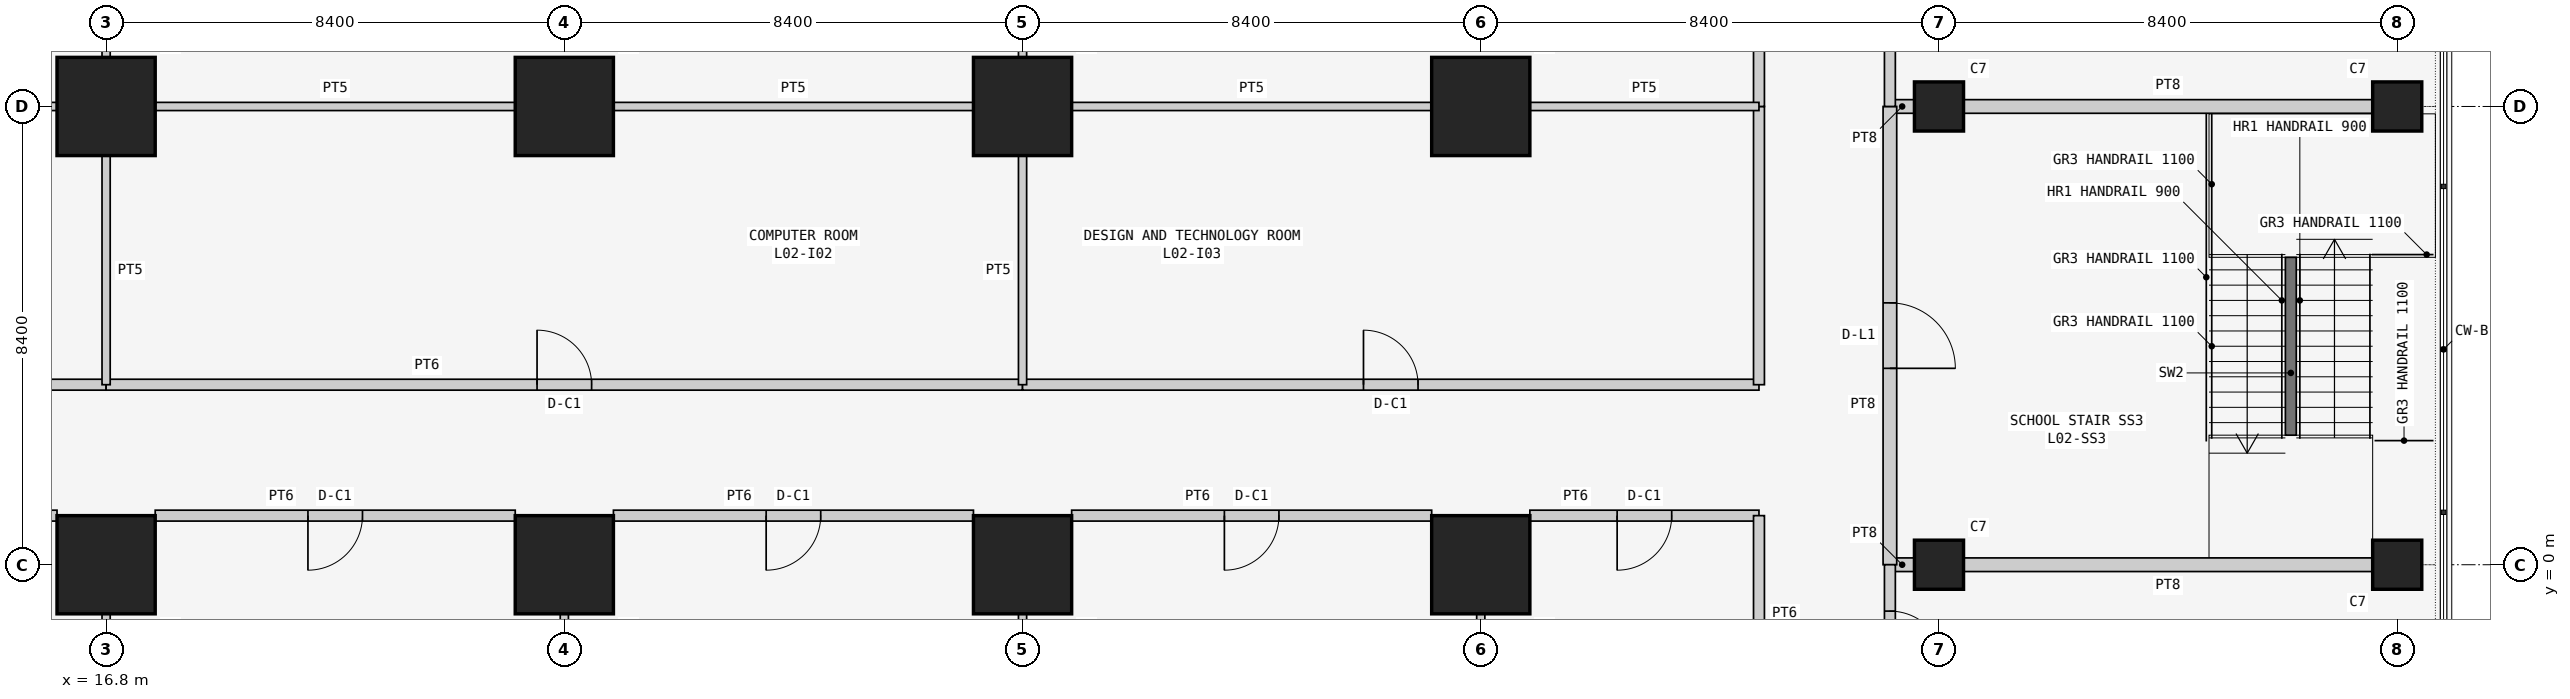
"""IFC4 building model, lengths in metres.
Left out: names, types, materials, properties, quantities, classifications, styles, units other than length and angle.
Written with IfcOpenShell. Run it as: python <this file> out.ifc"""

import sys

from ifc_helpers import new_model, si_unit, direction, frame, frame_2d, origin, origin_2d, place, context, subcontext, project, spatial, rectangle, extrude, element, fill, save


model = new_model("IFC4")
c1 = context("Model", 3, precision=1e-05, world=origin(), true_north=direction((0.0, 1.0)))
c2 = subcontext(c1, "Body", "Model", "MODEL_VIEW")
j1 = project(units=[si_unit("LENGTHUNIT", "METRE"), si_unit("PLANEANGLEUNIT", "RADIAN")], contexts=[c1])
p1 = place(None, origin())
s1 = spatial("IfcSite", under=j1, at=p1, CompositionType="ELEMENT")
p2 = place(p1, origin())
s2 = spatial("IfcBuilding", under=s1, at=p2, CompositionType="ELEMENT")
p3 = place(p2, frame((0.0, 0.0, 10.5)))
s3 = spatial("IfcBuildingStorey", under=s2, at=p3, CompositionType="ELEMENT", Elevation=10.5)
for number, where, z_axis, x_axis in (
    (1, (16.8, 0.0, 0.0), (0.0, 0.0, 1.0), (1.0, 0.0, 0.0)),
    (2, (16.8, 8.4, 0.0), (0.0, 0.0, 1.0), (1.0, 0.0, 0.0)),
    (3, (25.2, 0.0, 0.0), (0.0, 0.0, 1.0), (1.0, 0.0, 0.0)),
    (4, (25.2, 8.4, 0.0), (0.0, 0.0, 1.0), (1.0, 0.0, 0.0)),
    (5, (33.6, 0.0, 0.0), (0.0, 0.0, 1.0), (1.0, 0.0, 0.0)),
    (6, (33.6, 8.4, 0.0), (0.0, 0.0, 1.0), (1.0, 0.0, 0.0)),
    (7, (42.0, 0.0, 0.0), (0.0, 0.0, 1.0), (1.0, 0.0, 0.0)),
    (8, (42.0, 8.4, 0.0), (0.0, 0.0, 1.0), (1.0, 0.0, 0.0)),
):
    element("IfcColumn", number, at=place(p3, frame(where, z_axis=z_axis, x_axis=x_axis)), inside=s3, PredefinedType="COLUMN", context=c2, shape_type="SweptSolid", body=[
        extrude(rectangle(XDim=1.8, YDim=1.8, at=origin_2d()), origin(), (0.0, 0.0, 1.0), 4.5),
    ])
for number, where, z_axis, x_axis in (
    (9, (50.4, 0.0, 0.0), (0.0, 0.0, 1.0), (1.0, 0.0, 0.0)),
    (10, (50.4, 8.4, 0.0), (0.0, 0.0, 1.0), (1.0, 0.0, 0.0)),
    (11, (58.8, 0.0, 0.0), (0.0, 0.0, 1.0), (1.0, 0.0, 0.0)),
    (12, (58.8, 8.4, 0.0), (0.0, 0.0, 1.0), (1.0, 0.0, 0.0)),
):
    element("IfcColumn", number, at=place(p3, frame(where, z_axis=z_axis, x_axis=x_axis)), inside=s3, PredefinedType="COLUMN", context=c2, shape_type="SweptSolid", body=[
        extrude(rectangle(XDim=0.9, YDim=0.9, at=origin_2d()), origin(), (0.0, 0.0, 1.0), 4.5),
    ])
p4 = place(p3, frame((49.95, 0.0, 0.0), z_axis=(0.0, 0.0, 1.0), x_axis=(-1.0, 0.0, 0.0)))
e13 = element("IfcWall", 13, at=p4, inside=s3, PredefinedType="SOLIDWALL", context=c2, shape_type="SweptSolid", body=[
    extrude(rectangle(XDim=0.45, YDim=0.25, at=frame_2d((0.225, 0.0))), origin(), (0.0, 0.0, 1.0), 3.543),
])
p5 = place(p3, frame((58.35, 0.0, 0.0), z_axis=(0.0, 0.0, 1.0), x_axis=(-1.0, 0.0, 0.0)))
e14 = element("IfcWall", 14, at=p5, inside=s3, PredefinedType="SOLIDWALL", context=c2, shape_type="SweptSolid", body=[
    extrude(rectangle(XDim=7.5, YDim=0.25, at=frame_2d((3.75, 0.0))), origin(), (0.0, 0.0, 1.0), 3.543),
])
p6 = place(p3, frame((49.5, 8.4, 0.0), z_axis=(0.0, 0.0, 1.0), x_axis=(1.0, 0.0, 0.0)))
e15 = element("IfcWall", 15, at=p6, inside=s3, PredefinedType="SOLIDWALL", context=c2, shape_type="SweptSolid", body=[
    extrude(rectangle(XDim=0.45, YDim=0.25, at=frame_2d((0.225, 0.0))), origin(), (0.0, 0.0, 1.0), 3.543),
])
p7 = place(p3, frame((50.85, 8.4, 0.0), z_axis=(0.0, 0.0, 1.0), x_axis=(1.0, 0.0, 0.0)))
e16 = element("IfcWall", 16, at=p7, inside=s3, PredefinedType="SOLIDWALL", context=c2, shape_type="SweptSolid", body=[
    extrude(rectangle(XDim=7.5, YDim=0.25, at=frame_2d((3.75, 0.0))), origin(), (0.0, 0.0, 1.0), 3.543),
])
p8 = place(p3, frame((49.5, 0.0, 0.0), z_axis=(0.0, 0.0, 1.0), x_axis=(0.0, 1.0, 0.0)))
e17 = element("IfcWall", 17, at=p8, inside=s3, PredefinedType="SOLIDWALL", context=c2, shape_type="SweptSolid", body=[
    extrude(rectangle(XDim=8.4, YDim=0.25, at=frame_2d((4.2, 0.0))), origin(), (0.0, 0.0, 1.0), 4.3),
])
p9 = place(p8, frame((3.6, 0.0, 0.0)))
e18 = element("IfcOpeningElement", 18, at=p9, cuts=e17, PredefinedType="OPENING", context=c2, shape_type="SweptSolid", body=[
    extrude(rectangle(XDim=1.2, YDim=2.1, at=frame_2d((0.6, 1.05))), frame((0.0, 0.135, 0.0), z_axis=(0.0, -1.0, 0.0), x_axis=(1.0, 0.0, 0.0)), (0.0, 0.0, 1.0), 0.27),
])
p10 = place(p3, frame((16.8, -0.9, 0.0), z_axis=(0.0, 0.0, 1.0), x_axis=(0.0, -1.0, 0.0)))
e19 = element("IfcWall", 19, at=p10, inside=s3, PredefinedType="PARTITIONING", context=c2, shape_type="SweptSolid", body=[
    extrude(rectangle(XDim=7.05, YDim=0.15, at=frame_2d((3.525, 0.0))), origin(), (0.0, 0.0, 1.0), 3.543),
])
p11 = place(p3, frame((11.7, 0.9, 0.0), z_axis=(0.0, 0.0, 1.0), x_axis=(1.0, 0.0, 0.0)))
e20 = element("IfcWall", 20, at=p11, inside=s3, PredefinedType="PARTITIONING", context=c2, shape_type="SweptSolid", body=[
    extrude(rectangle(XDim=4.2, YDim=0.2, at=frame_2d((2.1, 0.0))), origin(), (0.0, 0.0, 1.0), 4.3),
])
p12 = place(p11, frame((1.6, 0.0, 0.0)))
e21 = element("IfcOpeningElement", 21, at=p12, cuts=e20, PredefinedType="OPENING", context=c2, shape_type="SweptSolid", body=[
    extrude(rectangle(XDim=1.0, YDim=2.1, at=frame_2d((0.5, 1.05))), frame((0.0, 0.11, 0.0), z_axis=(0.0, -1.0, 0.0), x_axis=(1.0, 0.0, 0.0)), (0.0, 0.0, 1.0), 0.22),
])
p13 = place(p3, frame((42.0, -7.95, 0.0), z_axis=(0.0, 0.0, 1.0), x_axis=(0.0, 1.0, 0.0)))
e22 = element("IfcWall", 22, at=p13, inside=s3, PredefinedType="PARTITIONING", context=c2, shape_type="SweptSolid", body=[
    extrude(rectangle(XDim=7.05, YDim=0.15, at=frame_2d((3.525, 0.0))), origin(), (0.0, 0.0, 1.0), 3.543),
])
p14 = place(p3, frame((42.9, 0.9, 0.0), z_axis=(0.0, 0.0, 1.0), x_axis=(1.0, 0.0, 0.0)))
e23 = element("IfcWall", 23, at=p14, inside=s3, PredefinedType="PARTITIONING", context=c2, shape_type="SweptSolid", body=[
    extrude(rectangle(XDim=4.2, YDim=0.2, at=frame_2d((2.1, 0.0))), origin(), (0.0, 0.0, 1.0), 4.3),
])
p15 = place(p14, frame((1.6, 0.0, 0.0)))
e24 = element("IfcOpeningElement", 24, at=p15, cuts=e23, PredefinedType="OPENING", context=c2, shape_type="SweptSolid", body=[
    extrude(rectangle(XDim=1.0, YDim=2.1, at=frame_2d((0.5, 1.05))), frame((0.0, 0.11, 0.0), z_axis=(0.0, -1.0, 0.0), x_axis=(1.0, 0.0, 0.0)), (0.0, 0.0, 1.0), 0.22),
])
p16 = place(p3, frame((47.1, 0.9, 0.0), z_axis=(0.0, 0.0, 1.0), x_axis=(0.0, -1.0, 0.0)))
e25 = element("IfcWall", 25, at=p16, inside=s3, PredefinedType="PARTITIONING", context=c2, shape_type="SweptSolid", body=[
    extrude(rectangle(XDim=3.6, YDim=0.2, at=frame_2d((1.8, 0.0))), origin(), (0.0, 0.0, 1.0), 4.3),
])
p17 = place(p3, frame((49.5, -2.7, 0.0), z_axis=(0.0, 0.0, 1.0), x_axis=(0.0, 1.0, 0.0)))
e26 = element("IfcWall", 26, at=p17, inside=s3, PredefinedType="PARTITIONING", context=c2, shape_type="SweptSolid", body=[
    extrude(rectangle(XDim=2.7, YDim=0.2, at=frame_2d((1.35, 0.0))), origin(), (0.0, 0.0, 1.0), 4.3),
])
p18 = place(p17, frame((0.85, 0.0, 0.0)))
e27 = element("IfcOpeningElement", 27, at=p18, cuts=e26, PredefinedType="OPENING", context=c2, shape_type="SweptSolid", body=[
    extrude(rectangle(XDim=1.0, YDim=2.1, at=frame_2d((0.5, 1.05))), frame((0.0, 0.11, 0.0), z_axis=(0.0, -1.0, 0.0), x_axis=(1.0, 0.0, 0.0)), (0.0, 0.0, 1.0), 0.22),
])
p19 = place(p3, frame((25.2, -0.9, 0.0), z_axis=(0.0, 0.0, 1.0), x_axis=(0.0, -1.0, 0.0)))
e28 = element("IfcWall", 28, at=p19, inside=s3, PredefinedType="PARTITIONING", context=c2, shape_type="SweptSolid", body=[
    extrude(rectangle(XDim=7.05, YDim=0.15, at=frame_2d((3.525, 0.0))), origin(), (0.0, 0.0, 1.0), 3.543),
])
p20 = place(p3, frame((17.7, 0.9, 0.0), z_axis=(0.0, 0.0, 1.0), x_axis=(1.0, 0.0, 0.0)))
e29 = element("IfcWall", 29, at=p20, inside=s3, PredefinedType="PARTITIONING", context=c2, shape_type="SweptSolid", body=[
    extrude(rectangle(XDim=6.6, YDim=0.2, at=frame_2d((3.3, 0.0))), origin(), (0.0, 0.0, 1.0), 4.3),
])
p21 = place(p20, frame((2.8, 0.0, 0.0)))
e30 = element("IfcOpeningElement", 30, at=p21, cuts=e29, PredefinedType="OPENING", context=c2, shape_type="SweptSolid", body=[
    extrude(rectangle(XDim=1.0, YDim=2.1, at=frame_2d((0.5, 1.05))), frame((0.0, 0.11, 0.0), z_axis=(0.0, -1.0, 0.0), x_axis=(1.0, 0.0, 0.0)), (0.0, 0.0, 1.0), 0.22),
])
p22 = place(p3, frame((33.6, -0.9, 0.0), z_axis=(0.0, 0.0, 1.0), x_axis=(0.0, -1.0, 0.0)))
e31 = element("IfcWall", 31, at=p22, inside=s3, PredefinedType="PARTITIONING", context=c2, shape_type="SweptSolid", body=[
    extrude(rectangle(XDim=7.05, YDim=0.15, at=frame_2d((3.525, 0.0))), origin(), (0.0, 0.0, 1.0), 3.543),
])
p23 = place(p3, frame((26.1, 0.9, 0.0), z_axis=(0.0, 0.0, 1.0), x_axis=(1.0, 0.0, 0.0)))
e32 = element("IfcWall", 32, at=p23, inside=s3, PredefinedType="PARTITIONING", context=c2, shape_type="SweptSolid", body=[
    extrude(rectangle(XDim=6.6, YDim=0.2, at=frame_2d((3.3, 0.0))), origin(), (0.0, 0.0, 1.0), 4.3),
])
p24 = place(p23, frame((2.8, 0.0, 0.0)))
e33 = element("IfcOpeningElement", 33, at=p24, cuts=e32, PredefinedType="OPENING", context=c2, shape_type="SweptSolid", body=[
    extrude(rectangle(XDim=1.0, YDim=2.1, at=frame_2d((0.5, 1.05))), frame((0.0, 0.11, 0.0), z_axis=(0.0, -1.0, 0.0), x_axis=(1.0, 0.0, 0.0)), (0.0, 0.0, 1.0), 0.22),
])
p25 = place(p3, frame((34.5, 0.9, 0.0), z_axis=(0.0, 0.0, 1.0), x_axis=(1.0, 0.0, 0.0)))
e34 = element("IfcWall", 34, at=p25, inside=s3, PredefinedType="PARTITIONING", context=c2, shape_type="SweptSolid", body=[
    extrude(rectangle(XDim=6.6, YDim=0.2, at=frame_2d((3.3, 0.0))), origin(), (0.0, 0.0, 1.0), 4.3),
])
p26 = place(p25, frame((2.8, 0.0, 0.0)))
e35 = element("IfcOpeningElement", 35, at=p26, cuts=e34, PredefinedType="OPENING", context=c2, shape_type="SweptSolid", body=[
    extrude(rectangle(XDim=1.0, YDim=2.1, at=frame_2d((0.5, 1.05))), frame((0.0, 0.11, 0.0), z_axis=(0.0, -1.0, 0.0), x_axis=(1.0, 0.0, 0.0)), (0.0, 0.0, 1.0), 0.22),
])
p27 = place(p3, frame((49.5, 8.4, 0.0), z_axis=(0.0, 0.0, 1.0), x_axis=(0.0, 1.0, 0.0)))
e36 = element("IfcWall", 36, at=p27, inside=s3, PredefinedType="PARTITIONING", context=c2, shape_type="SweptSolid", body=[
    extrude(rectangle(XDim=7.5, YDim=0.2, at=frame_2d((3.75, 0.0))), origin(), (0.0, 0.0, 1.0), 4.3),
])
p28 = place(p27, frame((3.25, 0.0, 0.0)))
e37 = element("IfcOpeningElement", 37, at=p28, cuts=e36, PredefinedType="OPENING", context=c2, shape_type="SweptSolid", body=[
    extrude(rectangle(XDim=1.0, YDim=2.1, at=frame_2d((0.5, 1.05))), frame((0.0, 0.11, 0.0), z_axis=(0.0, -1.0, 0.0), x_axis=(1.0, 0.0, 0.0)), (0.0, 0.0, 1.0), 0.22),
])
p29 = place(p3, frame((11.7, 3.3, 0.0), z_axis=(0.0, 0.0, 1.0), x_axis=(1.0, 0.0, 0.0)))
e38 = element("IfcWall", 38, at=p29, inside=s3, PredefinedType="PARTITIONING", context=c2, shape_type="SweptSolid", body=[
    extrude(rectangle(XDim=5.1, YDim=0.2, at=frame_2d((2.55, 0.0))), origin(), (0.0, 0.0, 1.0), 4.3),
])
p30 = place(p29, frame((2.05, 0.0, 0.0)))
e39 = element("IfcOpeningElement", 39, at=p30, cuts=e38, PredefinedType="OPENING", context=c2, shape_type="SweptSolid", body=[
    extrude(rectangle(XDim=1.0, YDim=2.1, at=frame_2d((0.5, 1.05))), frame((0.0, 0.11, 0.0), z_axis=(0.0, -1.0, 0.0), x_axis=(1.0, 0.0, 0.0)), (0.0, 0.0, 1.0), 0.22),
])
p31 = place(p3, frame((16.8, 3.3, 0.0), z_axis=(0.0, 0.0, 1.0), x_axis=(1.0, 0.0, 0.0)))
e40 = element("IfcWall", 40, at=p31, inside=s3, PredefinedType="PARTITIONING", context=c2, shape_type="SweptSolid", body=[
    extrude(rectangle(XDim=16.8, YDim=0.2, at=frame_2d((8.4, 0.0))), origin(), (0.0, 0.0, 1.0), 4.3),
])
p32 = place(p31, frame((7.9, 0.0, 0.0)))
e41 = element("IfcOpeningElement", 41, at=p32, cuts=e40, PredefinedType="OPENING", context=c2, shape_type="SweptSolid", body=[
    extrude(rectangle(XDim=1.0, YDim=2.1, at=frame_2d((0.5, 1.05))), frame((0.0, 0.11, 0.0), z_axis=(0.0, -1.0, 0.0), x_axis=(1.0, 0.0, 0.0)), (0.0, 0.0, 1.0), 0.22),
])
p33 = place(p3, frame((33.6, 3.3, 0.0), z_axis=(0.0, 0.0, 1.0), x_axis=(1.0, 0.0, 0.0)))
e42 = element("IfcWall", 42, at=p33, inside=s3, PredefinedType="PARTITIONING", context=c2, shape_type="SweptSolid", body=[
    extrude(rectangle(XDim=13.5, YDim=0.2, at=frame_2d((6.75, 0.0))), origin(), (0.0, 0.0, 1.0), 4.3),
])
p34 = place(p33, frame((6.25, 0.0, 0.0)))
e43 = element("IfcOpeningElement", 43, at=p34, cuts=e42, PredefinedType="OPENING", context=c2, shape_type="SweptSolid", body=[
    extrude(rectangle(XDim=1.0, YDim=2.1, at=frame_2d((0.5, 1.05))), frame((0.0, 0.11, 0.0), z_axis=(0.0, -1.0, 0.0), x_axis=(1.0, 0.0, 0.0)), (0.0, 0.0, 1.0), 0.22),
])
p35 = place(p3, frame((47.1, 3.3, 0.0), z_axis=(0.0, 0.0, 1.0), x_axis=(0.0, 1.0, 0.0)))
e44 = element("IfcWall", 44, at=p35, inside=s3, PredefinedType="PARTITIONING", context=c2, shape_type="SweptSolid", body=[
    extrude(rectangle(XDim=5.1, YDim=0.2, at=frame_2d((2.55, 0.0))), origin(), (0.0, 0.0, 1.0), 4.3),
])
p36 = place(p3, frame((47.1, 8.4, 0.0), z_axis=(0.0, 0.0, 1.0), x_axis=(0.0, 1.0, 0.0)))
e45 = element("IfcWall", 45, at=p36, inside=s3, PredefinedType="PARTITIONING", context=c2, shape_type="SweptSolid", body=[
    extrude(rectangle(XDim=8.4, YDim=0.2, at=frame_2d((4.2, 0.0))), origin(), (0.0, 0.0, 1.0), 4.3),
])
p37 = place(p36, frame((3.7, 0.0, 0.0)))
e46 = element("IfcOpeningElement", 46, at=p37, cuts=e45, PredefinedType="OPENING", context=c2, shape_type="SweptSolid", body=[
    extrude(rectangle(XDim=1.0, YDim=2.1, at=frame_2d((0.5, 1.05))), frame((0.0, 0.11, 0.0), z_axis=(0.0, -1.0, 0.0), x_axis=(1.0, 0.0, 0.0)), (0.0, 0.0, 1.0), 0.22),
])
for number, where, z_axis, x_axis in (
    (47, (16.8, 7.5, 0.0), (0.0, 0.0, 1.0), (0.0, -1.0, 0.0)),
    (48, (11.7, 8.4, 0.0), (0.0, 0.0, 1.0), (1.0, 0.0, 0.0)),
    (49, (33.6, 7.5, 0.0), (0.0, 0.0, 1.0), (0.0, -1.0, 0.0)),
):
    element("IfcWall", number, at=place(p3, frame(where, z_axis=z_axis, x_axis=x_axis)), inside=s3, PredefinedType="PARTITIONING", context=c2, shape_type="SweptSolid", body=[
        extrude(rectangle(XDim=4.2, YDim=0.15, at=frame_2d((2.1, 0.0))), origin(), (0.0, 0.0, 1.0), 3.543),
    ])
p38 = place(p3, frame((17.7, 8.4, 0.0), z_axis=(0.0, 0.0, 1.0), x_axis=(1.0, 0.0, 0.0)))
e50 = element("IfcWall", 50, at=p38, inside=s3, PredefinedType="PARTITIONING", context=c2, shape_type="SweptSolid", body=[
    extrude(rectangle(XDim=6.6, YDim=0.15, at=frame_2d((3.3, 0.0))), origin(), (0.0, 0.0, 1.0), 3.543),
])
p39 = place(p3, frame((26.1, 8.4, 0.0), z_axis=(0.0, 0.0, 1.0), x_axis=(1.0, 0.0, 0.0)))
e51 = element("IfcWall", 51, at=p39, inside=s3, PredefinedType="PARTITIONING", context=c2, shape_type="SweptSolid", body=[
    extrude(rectangle(XDim=6.6, YDim=0.15, at=frame_2d((3.3, 0.0))), origin(), (0.0, 0.0, 1.0), 3.543),
])
p40 = place(p3, frame((34.5, 8.4, 0.0), z_axis=(0.0, 0.0, 1.0), x_axis=(1.0, 0.0, 0.0)))
e52 = element("IfcWall", 52, at=p40, inside=s3, PredefinedType="PARTITIONING", context=c2, shape_type="SweptSolid", body=[
    extrude(rectangle(XDim=6.6, YDim=0.15, at=frame_2d((3.3, 0.0))), origin(), (0.0, 0.0, 1.0), 3.543),
])
p41 = place(p3, frame((42.9, 8.4, 0.0), z_axis=(0.0, 0.0, 1.0), x_axis=(1.0, 0.0, 0.0)))
e53 = element("IfcWall", 53, at=p41, inside=s3, PredefinedType="PARTITIONING", context=c2, shape_type="SweptSolid", body=[
    extrude(rectangle(XDim=4.2, YDim=0.15, at=frame_2d((2.1, 0.0))), origin(), (0.0, 0.0, 1.0), 3.543),
])
for number, where, z_axis, x_axis in (
    (54, (16.8, 15.9, 0.0), (0.0, 0.0, 1.0), (0.0, -1.0, 0.0)),
    (55, (33.6, 15.9, 0.0), (0.0, 0.0, 1.0), (0.0, -1.0, 0.0)),
):
    element("IfcWall", number, at=place(p3, frame(where, z_axis=z_axis, x_axis=x_axis)), inside=s3, PredefinedType="PARTITIONING", context=c2, shape_type="SweptSolid", body=[
        extrude(rectangle(XDim=6.6, YDim=0.15, at=frame_2d((3.3, 0.0))), origin(), (0.0, 0.0, 1.0), 3.543),
    ])
p42 = place(p3, frame((56.85, 2.375, 0.0), z_axis=(0.0, 0.0, 1.0), x_axis=(0.0, 1.0, 0.0)))
e56 = element("IfcWall", 56, at=p42, inside=s3, PredefinedType="SOLIDWALL", context=c2, shape_type="SweptSolid", body=[
    extrude(rectangle(XDim=3.26, YDim=0.2, at=frame_2d((1.63, 0.0))), origin(), (0.0, 0.0, 1.0), 4.5),
])
p43 = place(p9, frame((1.2, 0.0, 0.0), z_axis=(0.0, 0.0, 1.0), x_axis=(-1.0, 0.0, 0.0)))
e57 = element("IfcDoor", 57, at=p43, inside=s3, OperationType="SINGLE_SWING_RIGHT", PredefinedType="DOOR", context=c2, shape_type="SweptSolid", body=[
    extrude(rectangle(XDim=1.2, YDim=2.1, at=frame_2d((0.6, 1.05))), frame((0.0, 0.025, 0.0), z_axis=(0.0, -1.0, 0.0), x_axis=(1.0, 0.0, 0.0)), (0.0, 0.0, 1.0), 0.05),
])
fill(e18, e57)
p44 = place(p15, frame((1.0, 0.0, 0.0), z_axis=(0.0, 0.0, 1.0), x_axis=(-1.0, 0.0, 0.0)))
e58 = element("IfcDoor", 58, at=p44, inside=s3, OperationType="SINGLE_SWING_RIGHT", PredefinedType="DOOR", context=c2, shape_type="SweptSolid", body=[
    extrude(rectangle(XDim=1.0, YDim=2.1, at=frame_2d((0.5, 1.05))), frame((0.0, 0.025, 0.0), z_axis=(0.0, -1.0, 0.0), x_axis=(1.0, 0.0, 0.0)), (0.0, 0.0, 1.0), 0.05),
])
fill(e24, e58)
p45 = place(p18, frame((1.0, 0.0, 0.0), z_axis=(0.0, 0.0, 1.0), x_axis=(-1.0, 0.0, 0.0)))
e59 = element("IfcDoor", 59, at=p45, inside=s3, OperationType="SINGLE_SWING_RIGHT", PredefinedType="DOOR", context=c2, shape_type="SweptSolid", body=[
    extrude(rectangle(XDim=1.0, YDim=2.1, at=frame_2d((0.5, 1.05))), frame((0.0, 0.025, 0.0), z_axis=(0.0, -1.0, 0.0), x_axis=(1.0, 0.0, 0.0)), (0.0, 0.0, 1.0), 0.05),
])
fill(e27, e59)
p46 = place(p21, frame((1.0, 0.0, 0.0), z_axis=(0.0, 0.0, 1.0), x_axis=(-1.0, 0.0, 0.0)))
e60 = element("IfcDoor", 60, at=p46, inside=s3, OperationType="SINGLE_SWING_RIGHT", PredefinedType="DOOR", context=c2, shape_type="SweptSolid", body=[
    extrude(rectangle(XDim=1.0, YDim=2.1, at=frame_2d((0.5, 1.05))), frame((0.0, 0.025, 0.0), z_axis=(0.0, -1.0, 0.0), x_axis=(1.0, 0.0, 0.0)), (0.0, 0.0, 1.0), 0.05),
])
fill(e30, e60)
p47 = place(p24, frame((1.0, 0.0, 0.0), z_axis=(0.0, 0.0, 1.0), x_axis=(-1.0, 0.0, 0.0)))
e61 = element("IfcDoor", 61, at=p47, inside=s3, OperationType="SINGLE_SWING_RIGHT", PredefinedType="DOOR", context=c2, shape_type="SweptSolid", body=[
    extrude(rectangle(XDim=1.0, YDim=2.1, at=frame_2d((0.5, 1.05))), frame((0.0, 0.025, 0.0), z_axis=(0.0, -1.0, 0.0), x_axis=(1.0, 0.0, 0.0)), (0.0, 0.0, 1.0), 0.05),
])
fill(e33, e61)
p48 = place(p26, frame((1.0, 0.0, 0.0), z_axis=(0.0, 0.0, 1.0), x_axis=(-1.0, 0.0, 0.0)))
e62 = element("IfcDoor", 62, at=p48, inside=s3, OperationType="SINGLE_SWING_RIGHT", PredefinedType="DOOR", context=c2, shape_type="SweptSolid", body=[
    extrude(rectangle(XDim=1.0, YDim=2.1, at=frame_2d((0.5, 1.05))), frame((0.0, 0.025, 0.0), z_axis=(0.0, -1.0, 0.0), x_axis=(1.0, 0.0, 0.0)), (0.0, 0.0, 1.0), 0.05),
])
fill(e35, e62)
p49 = place(p32, origin())
e63 = element("IfcDoor", 63, at=p49, inside=s3, OperationType="SINGLE_SWING_LEFT", PredefinedType="DOOR", context=c2, shape_type="SweptSolid", body=[
    extrude(rectangle(XDim=1.0, YDim=2.1, at=frame_2d((0.5, 1.05))), frame((0.0, 0.025, 0.0), z_axis=(0.0, -1.0, 0.0), x_axis=(1.0, 0.0, 0.0)), (0.0, 0.0, 1.0), 0.05),
])
fill(e41, e63)
p50 = place(p34, origin())
e64 = element("IfcDoor", 64, at=p50, inside=s3, OperationType="SINGLE_SWING_LEFT", PredefinedType="DOOR", context=c2, shape_type="SweptSolid", body=[
    extrude(rectangle(XDim=1.0, YDim=2.1, at=frame_2d((0.5, 1.05))), frame((0.0, 0.025, 0.0), z_axis=(0.0, -1.0, 0.0), x_axis=(1.0, 0.0, 0.0)), (0.0, 0.0, 1.0), 0.05),
])
fill(e43, e64)
save(model, sys.argv[1])
